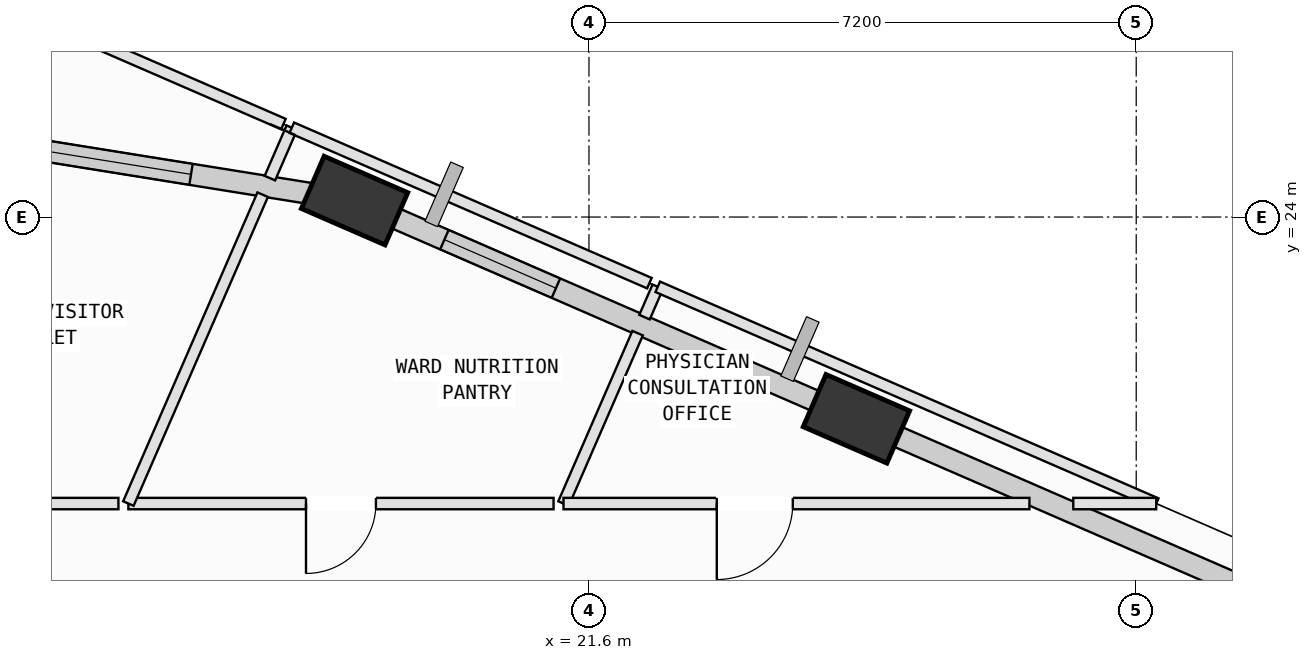
"""IFC4 building model, lengths in metres.
Left out: names, types, materials, properties, quantities, classifications, styles, units other than length and angle.
Written with IfcOpenShell. Run it as: python <this file> out.ifc"""

import sys

from ifc_helpers import new_model, si_unit, direction, frame, frame_2d, origin, origin_2d, place, context, subcontext, project, spatial, rectangle, extrude, element, fill, save


model = new_model("IFC4")
c1 = context("Model", 3, precision=1e-05, world=origin(), true_north=direction((0.0, 1.0)))
c2 = subcontext(c1, "Body", "Model", "MODEL_VIEW")
j1 = project(units=[si_unit("LENGTHUNIT", "METRE"), si_unit("PLANEANGLEUNIT", "RADIAN")], contexts=[c1])
p1 = place(None, origin())
s1 = spatial("IfcSite", under=j1, at=p1, CompositionType="ELEMENT")
p2 = place(p1, origin())
s2 = spatial("IfcBuilding", under=s1, at=p2, CompositionType="ELEMENT")
p3 = place(p2, frame((0.0, 0.0, 324.6)))
s3 = spatial("IfcBuildingStorey", under=s2, at=p3, CompositionType="ELEMENT", Elevation=324.6)
for number, where, z_axis, x_axis in (
    (1, (25.119, 21.345, 0.002), (0.0, 0.0, 1.0), (-0.917, 0.399, 0.0)),
    (2, (18.516, 24.216, 0.002), (0.0, 0.0, 1.0), (-0.917, 0.399, 0.0)),
):
    element("IfcColumn", number, at=place(p3, frame(where, z_axis=z_axis, x_axis=x_axis)), inside=s3, PredefinedType="COLUMN", context=c2, shape_type="SweptSolid", body=[
        extrude(rectangle(XDim=1.2, YDim=0.75, at=origin_2d()), origin(), (0.0, 0.0, 1.0), 3.996),
    ])
p4 = place(p3, frame((25.484, 21.187, 0.0), z_axis=(0.0, 0.0, 1.0), x_axis=(0.917060568388, -0.398747932794, 0.0)))
e3 = element("IfcWall", 3, at=p4, inside=s3, PredefinedType="SOLIDWALL", context=c2, shape_type="SweptSolid", body=[
    extrude(rectangle(XDim=6.955, YDim=0.28, at=frame_2d((3.478, 0.0))), origin(), (0.0, 0.0, 1.0), 2.765),
])
p5 = place(p3, frame((18.881, 24.058, 0.0), z_axis=(0.0, 0.0, 1.0), x_axis=(0.917070056253, -0.398726111414, 0.0)))
e4 = element("IfcWall", 4, at=p5, inside=s3, PredefinedType="SOLIDWALL", context=c2, shape_type="SweptSolid", body=[
    extrude(rectangle(XDim=6.405, YDim=0.28, at=frame_2d((3.202, 0.0))), origin(), (0.0, 0.0, 1.0), 3.265),
])
p6 = place(p5, frame((0.891, 0.0, 0.75)))
e5 = element("IfcOpeningElement", 5, at=p6, cuts=e4, PredefinedType="OPENING", context=c2, shape_type="SweptSolid", body=[
    extrude(rectangle(XDim=1.6, YDim=1.95, at=frame_2d((0.8, 0.975))), frame((0.0, 0.15, 0.0), z_axis=(0.0, -1.0, 0.0), x_axis=(1.0, 0.0, 0.0)), (0.0, 0.0, 1.0), 0.3),
])
p7 = place(p3, frame((12.946, 25.11, 0.0), z_axis=(0.0, 0.0, 1.0), x_axis=(0.987363821305, -0.158469821666, 0.0)))
e6 = element("IfcWall", 6, at=p7, inside=s3, PredefinedType="SOLIDWALL", context=c2, shape_type="SweptSolid", body=[
    extrude(rectangle(XDim=5.244, YDim=0.28, at=frame_2d((2.622, 0.0))), origin(), (0.0, 0.0, 1.0), 3.265),
])
p8 = place(p7, frame((1.462, 0.0, 0.75)))
e7 = element("IfcOpeningElement", 7, at=p8, cuts=e6, PredefinedType="OPENING", context=c2, shape_type="SweptSolid", body=[
    extrude(rectangle(XDim=2.0, YDim=1.95, at=frame_2d((1.0, 0.975))), frame((0.0, 0.15, 0.0), z_axis=(0.0, -1.0, 0.0), x_axis=(1.0, 0.0, 0.0)), (0.0, 0.0, 1.0), 0.3),
])
p9 = place(p3, frame((21.265, 20.23, 0.0), z_axis=(0.0, 0.0, 1.0), x_axis=(0.398842956111, 0.91701924536, 0.0)))
e8 = element("IfcWall", 8, at=p9, inside=s3, PredefinedType="PARTITIONING", context=c2, shape_type="SweptSolid", body=[
    extrude(rectangle(XDim=2.445, YDim=0.15, at=frame_2d((1.222, 0.0))), origin(), (0.0, 0.0, 1.0), 3.78),
])
p10 = place(p3, frame((22.331, 22.683, 0.0), z_axis=(0.0, 0.0, 1.0), x_axis=(0.399464528742, 0.916748651636, 0.0)))
e9 = element("IfcWall", 9, at=p10, inside=s3, PredefinedType="PARTITIONING", context=c2, shape_type="SweptSolid", body=[
    extrude(rectangle(XDim=0.435, YDim=0.15, at=frame_2d((0.218, 0.0))), origin(), (0.0, 0.0, 1.0), 3.78),
])
p11 = place(p3, frame((22.505, 23.082, 0.0), z_axis=(0.0, 0.0, 1.0), x_axis=(0.917034231322, -0.398808498634, 0.0)))
e10 = element("IfcWall", 10, at=p11, inside=s3, PredefinedType="PARTITIONING", context=c2, shape_type="SweptSolid", body=[
    extrude(rectangle(XDim=7.151, YDim=0.15, at=frame_2d((3.576, 0.0))), origin(), (0.0, 0.0, 1.0), 3.78),
])
p12 = place(p3, frame((29.063, 20.23, 0.0), z_axis=(0.0, 0.0, 1.0), x_axis=(-1.0, 0.0, 0.0)))
e11 = element("IfcWall", 11, at=p12, inside=s3, PredefinedType="PARTITIONING", context=c2, shape_type="SweptSolid", body=[
    extrude(rectangle(XDim=1.091, YDim=0.15, at=frame_2d((0.545, 0.0))), origin(), (0.0, 0.0, 1.0), 3.78),
])
p13 = place(p3, frame((27.395, 20.23, 0.0), z_axis=(0.0, 0.0, 1.0), x_axis=(-1.0, 0.0, 0.0)))
e12 = element("IfcWall", 12, at=p13, inside=s3, PredefinedType="PARTITIONING", context=c2, shape_type="SweptSolid", body=[
    extrude(rectangle(XDim=6.13, YDim=0.15, at=frame_2d((3.065, 0.0))), origin(), (0.0, 0.0, 1.0), 3.78),
])
p14 = place(p13, frame((3.113, 0.0, 0.0)))
e13 = element("IfcOpeningElement", 13, at=p14, cuts=e12, PredefinedType="OPENING", context=c2, shape_type="SweptSolid", body=[
    extrude(rectangle(XDim=1.0, YDim=2.12, at=frame_2d((0.5, 1.06))), frame((0.0, 0.085, 0.0), z_axis=(0.0, -1.0, 0.0), x_axis=(1.0, 0.0, 0.0)), (0.0, 0.0, 1.0), 0.17),
])
p15 = place(p3, frame((21.134, 20.23, 0.0), z_axis=(0.0, 0.0, 1.0), x_axis=(-1.0, 0.0, 0.0)))
e14 = element("IfcWall", 14, at=p15, inside=s3, PredefinedType="PARTITIONING", context=c2, shape_type="SweptSolid", body=[
    extrude(rectangle(XDim=5.594, YDim=0.15, at=frame_2d((2.797, 0.0))), origin(), (0.0, 0.0, 1.0), 3.415),
])
p16 = place(p15, frame((2.337, 0.0, 0.0)))
e15 = element("IfcOpeningElement", 15, at=p16, cuts=e14, PredefinedType="OPENING", context=c2, shape_type="SweptSolid", body=[
    extrude(rectangle(XDim=0.92, YDim=2.1, at=frame_2d((0.46, 1.05))), frame((0.0, 0.085, 0.0), z_axis=(0.0, -1.0, 0.0), x_axis=(1.0, 0.0, 0.0)), (0.0, 0.0, 1.0), 0.17),
])
p17 = place(p3, frame((15.54, 20.23, 0.0), z_axis=(0.0, 0.0, 1.0), x_axis=(0.398707980575, 0.917077939014, 0.0)))
e16 = element("IfcWall", 16, at=p17, inside=s3, PredefinedType="PARTITIONING", context=c2, shape_type="SweptSolid", body=[
    extrude(rectangle(XDim=4.431, YDim=0.15, at=frame_2d((2.216, 0.0))), origin(), (0.0, 0.0, 1.0), 2.765),
])
p18 = place(p3, frame((17.402, 24.512, 0.0), z_axis=(0.0, 0.0, 1.0), x_axis=(0.398195004061, 0.917300789677, 0.0)))
e17 = element("IfcWall", 17, at=p18, inside=s3, PredefinedType="PARTITIONING", context=c2, shape_type="SweptSolid", body=[
    extrude(rectangle(XDim=0.723, YDim=0.15, at=frame_2d((0.361, 0.0))), origin(), (0.0, 0.0, 1.0), 3.78),
])
p19 = place(p3, frame((17.69, 25.175, 0.0), z_axis=(0.0, 0.0, 1.0), x_axis=(0.917107123666, -0.398640845525, 0.0)))
e18 = element("IfcWall", 18, at=p19, inside=s3, PredefinedType="PARTITIONING", context=c2, shape_type="SweptSolid", body=[
    extrude(rectangle(XDim=5.13, YDim=0.15, at=frame_2d((2.565, 0.0))), origin(), (0.0, 0.0, 1.0), 3.78),
])
p20 = place(p3, frame((14.288, 26.654, 0.0), z_axis=(0.0, 0.0, 1.0), x_axis=(0.917085193586, -0.398691293741, 0.0)))
e19 = element("IfcWall", 19, at=p20, inside=s3, PredefinedType="PARTITIONING", context=c2, shape_type="SweptSolid", body=[
    extrude(rectangle(XDim=3.59, YDim=0.15, at=frame_2d((1.795, 0.0))), origin(), (0.0, 0.0, 1.0), 3.78),
])
p21 = place(p3, frame((15.409, 20.23, 0.0), z_axis=(0.0, 0.0, 1.0), x_axis=(-1.0, 0.0, 0.0)))
e20 = element("IfcWall", 20, at=p21, inside=s3, PredefinedType="PARTITIONING", context=c2, shape_type="SweptSolid", body=[
    extrude(rectangle(XDim=2.897, YDim=0.15, at=frame_2d((1.448, 0.0))), origin(), (0.0, 0.0, 1.0), 3.415),
])
p22 = place(p21, frame((0.989, 0.0, 0.0)))
e21 = element("IfcOpeningElement", 21, at=p22, cuts=e20, PredefinedType="OPENING", context=c2, shape_type="SweptSolid", body=[
    extrude(rectangle(XDim=0.92, YDim=2.1, at=frame_2d((0.46, 1.05))), frame((0.0, 0.085, 0.0), z_axis=(0.0, -1.0, 0.0), x_axis=(1.0, 0.0, 0.0)), (0.0, 0.0, 1.0), 0.17),
])
p23 = place(p6, origin())
e22 = element("IfcWindow", 22, at=p23, inside=s3, PartitioningType="SINGLE_PANEL", PredefinedType="WINDOW", context=c2, shape_type="SweptSolid", body=[
    extrude(rectangle(XDim=1.6, YDim=1.95, at=frame_2d((0.8, 0.975))), frame((0.0, 0.03, 0.0), z_axis=(0.0, -1.0, 0.0), x_axis=(1.0, 0.0, 0.0)), (0.0, 0.0, 1.0), 0.06),
])
fill(e5, e22)
p24 = place(p8, origin())
e23 = element("IfcWindow", 23, at=p24, inside=s3, PartitioningType="SINGLE_PANEL", PredefinedType="WINDOW", context=c2, shape_type="SweptSolid", body=[
    extrude(rectangle(XDim=2.0, YDim=1.95, at=frame_2d((1.0, 0.975))), frame((0.0, 0.03, 0.0), z_axis=(0.0, -1.0, 0.0), x_axis=(1.0, 0.0, 0.0)), (0.0, 0.0, 1.0), 0.06),
])
fill(e7, e23)
p25 = place(p14, origin())
e24 = element("IfcDoor", 24, at=p25, inside=s3, OperationType="SINGLE_SWING_RIGHT", PredefinedType="DOOR", context=c2, shape_type="SweptSolid", body=[
    extrude(rectangle(XDim=1.0, YDim=2.12, at=frame_2d((0.5, 1.06))), frame((0.0, 0.025, 0.0), z_axis=(0.0, -1.0, 0.0), x_axis=(1.0, 0.0, 0.0)), (0.0, 0.0, 1.0), 0.05),
])
fill(e13, e24)
p26 = place(p16, origin())
e25 = element("IfcDoor", 25, at=p26, inside=s3, OperationType="SINGLE_SWING_RIGHT", PredefinedType="DOOR", context=c2, shape_type="SweptSolid", body=[
    extrude(rectangle(XDim=0.92, YDim=2.1, at=frame_2d((0.46, 1.05))), frame((0.0, 0.025, 0.0), z_axis=(0.0, -1.0, 0.0), x_axis=(1.0, 0.0, 0.0)), (0.0, 0.0, 1.0), 0.05),
])
fill(e15, e25)
save(model, sys.argv[1])
